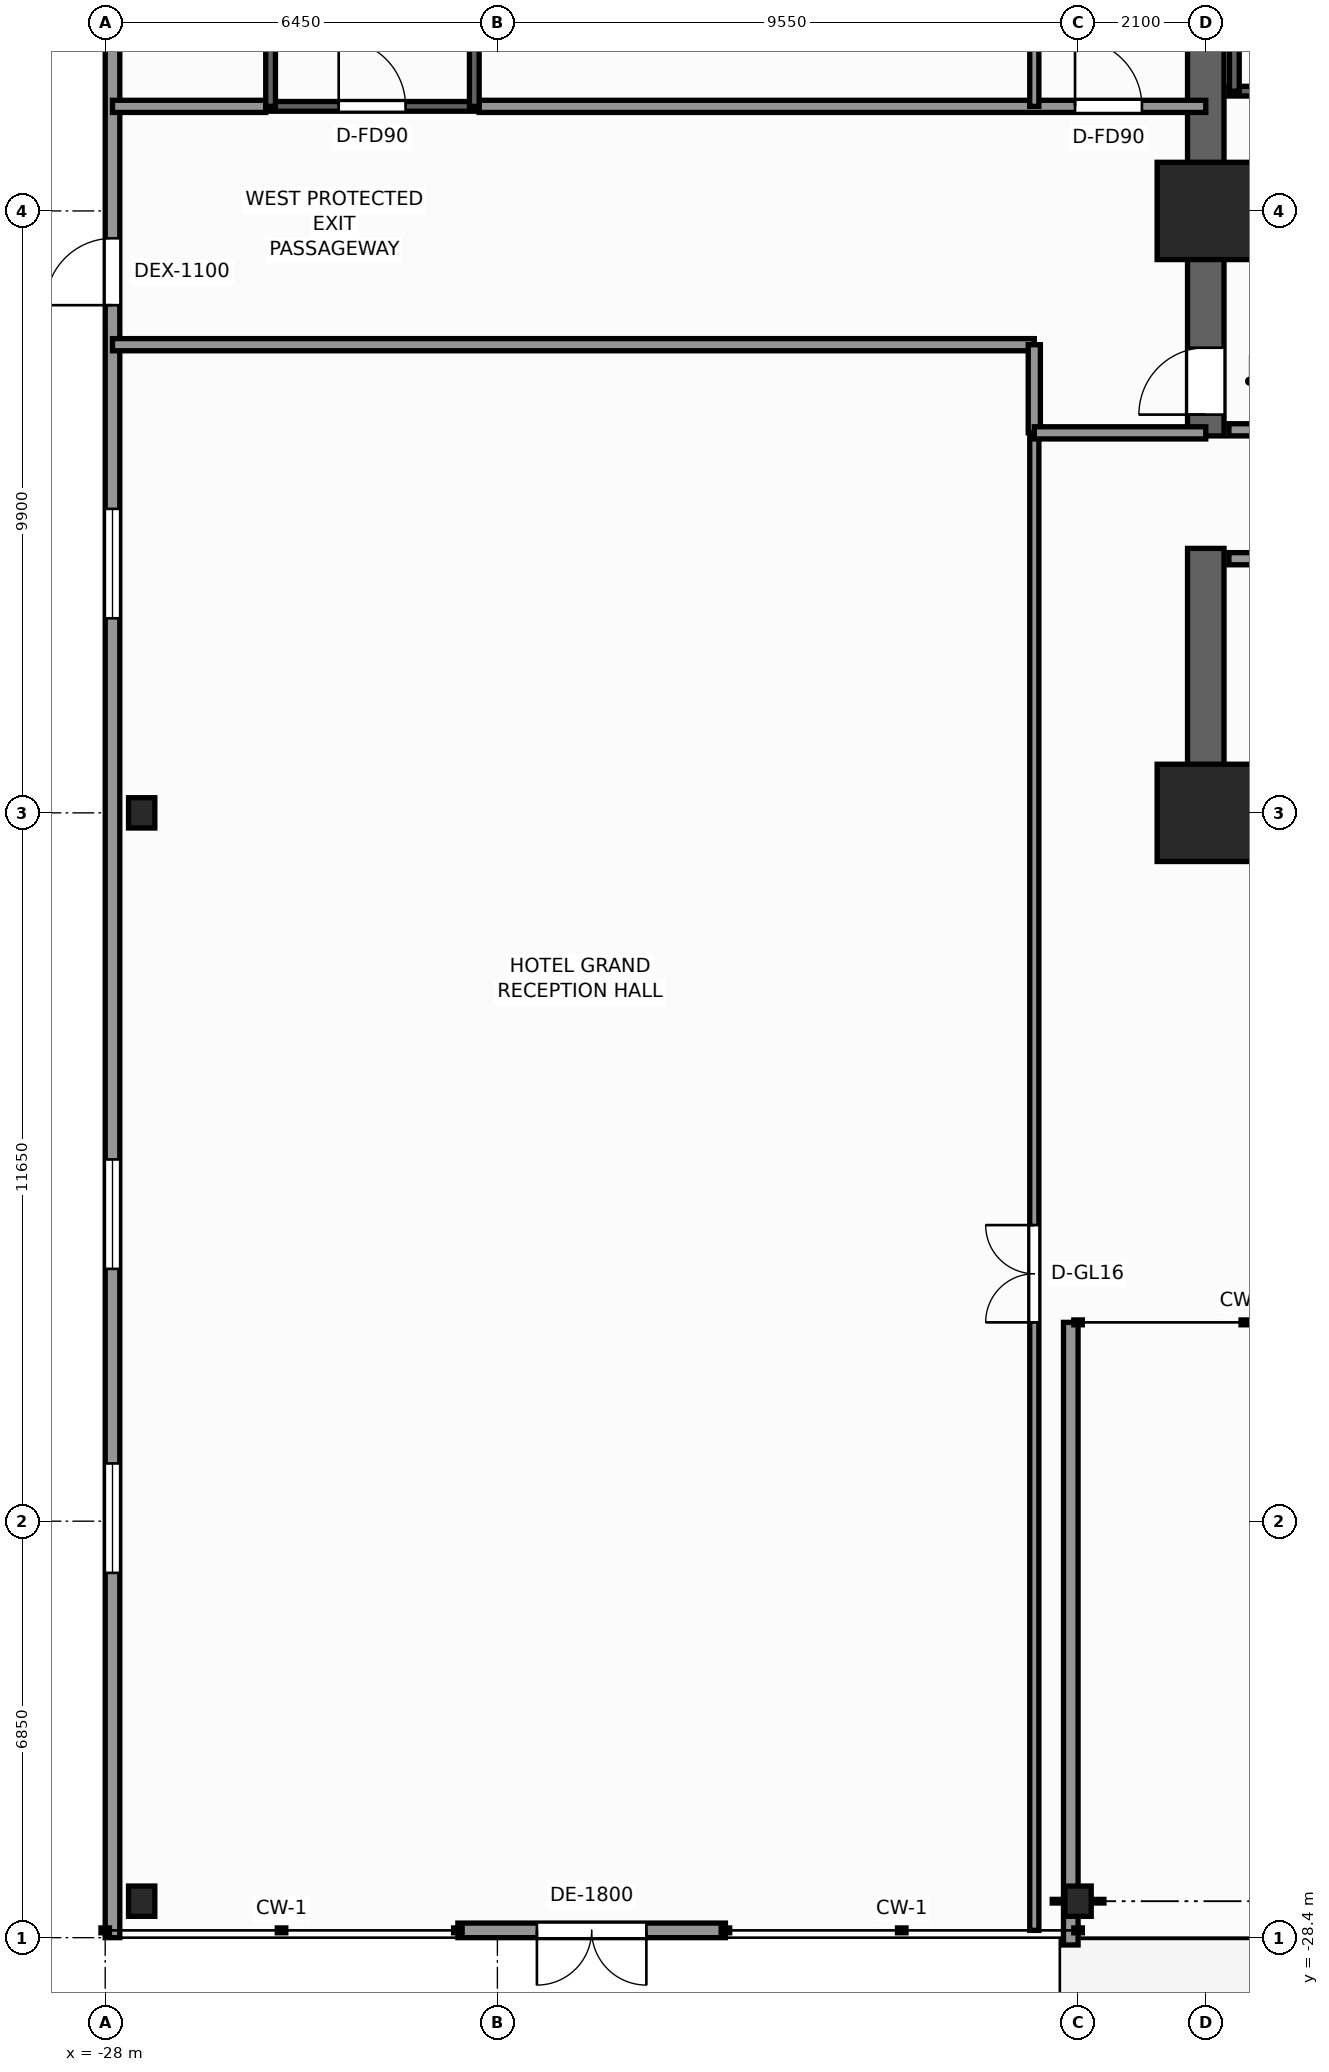
"""IFC4 building model, lengths in metres.
Left out: names, types, materials, properties, quantities, classifications, styles, units other than length and angle.
Written with IfcOpenShell. Run it as: python <this file> out.ifc"""

import sys

from ifc_helpers import new_model, si_unit, direction, frame, frame_2d, origin, origin_2d, place, context, subcontext, project, spatial, rectangle, i_section, extrude, element, fill, save


model = new_model("IFC4")
c1 = context("Model", 3, precision=1e-05, world=origin(), true_north=direction((0.0, 1.0)))
c2 = subcontext(c1, "Body", "Model", "MODEL_VIEW")
j1 = project(units=[si_unit("LENGTHUNIT", "METRE"), si_unit("PLANEANGLEUNIT", "RADIAN")], contexts=[c1])
p1 = place(None, origin())
s1 = spatial("IfcSite", under=j1, at=p1, CompositionType="ELEMENT")
p2 = place(p1, origin())
s2 = spatial("IfcBuilding", under=s1, at=p2, CompositionType="ELEMENT")
p3 = place(p2, origin())
s3 = spatial("IfcBuildingStorey", under=s2, at=p3, CompositionType="ELEMENT", Elevation=0.0)
p4 = place(p3, frame((-3.54, -9.9, 0.0), z_axis=(0.0, 0.0, 1.0), x_axis=(-1.0, 0.0, 0.0)))
e1 = element("IfcWall", 1, at=p4, inside=s3, PredefinedType="SHEAR", context=c2, shape_type="SweptSolid", body=[
    extrude(rectangle(XDim=6.66, YDim=0.6, at=frame_2d((3.33, 0.0))), origin(), (0.0, 0.0, 1.0), 5.5),
])
p5 = place(p3, frame((-9.9, -9.6, 0.0), z_axis=(0.0, 0.0, 1.0), x_axis=(0.0, 1.0, 0.0)))
e2 = element("IfcWall", 2, at=p5, inside=s3, PredefinedType="SHEAR", context=c2, shape_type="SweptSolid", body=[
    extrude(rectangle(XDim=4.05, YDim=0.6, at=frame_2d((2.025, 0.0))), origin(), (0.0, 0.0, 1.0), 5.5),
])
p6 = place(p3, frame((-9.9, -3.7, 0.0), z_axis=(0.0, 0.0, 1.0), x_axis=(0.0, 1.0, 0.0)))
e3 = element("IfcWall", 3, at=p6, inside=s3, PredefinedType="SHEAR", context=c2, shape_type="SweptSolid", body=[
    extrude(rectangle(XDim=13.3, YDim=0.6, at=frame_2d((6.65, 0.0))), origin(), (0.0, 0.0, 1.0), 5.5),
])
p7 = place(p6, frame((0.35, 0.0, 0.0)))
e4 = element("IfcOpeningElement", 4, at=p7, cuts=e3, PredefinedType="OPENING", context=c2, shape_type="SweptSolid", body=[
    extrude(rectangle(XDim=1.1, YDim=2.2, at=frame_2d((0.55, 1.1))), frame((0.0, 0.31, 0.0), z_axis=(0.0, -1.0, 0.0), x_axis=(1.0, 0.0, 0.0)), (0.0, 0.0, 1.0), 0.62),
])
for number, where, z_axis, x_axis in (
    (5, (-9.9, -9.9, 0.0), (0.0, 0.0, 1.0), (1.0, 0.0, 0.0)),
    (6, (-9.9, 0.0, 0.0), (0.0, 0.0, 1.0), (1.0, 0.0, 0.0)),
):
    element("IfcColumn", number, at=place(p3, frame(where, z_axis=z_axis, x_axis=x_axis)), inside=s3, PredefinedType="COLUMN", context=c2, shape_type="SweptSolid", body=[
        extrude(rectangle(XDim=1.6, YDim=1.6, at=origin_2d()), origin(), (0.0, 0.0, 1.0), 5.5),
    ])
for number, where, z_axis, x_axis in (
    (7, (-27.4, -27.8, 0.0), (0.0, 0.0, 1.0), (1.0, 0.0, 0.0)),
    (8, (-12.0, -27.8, 0.0), (0.0, 0.0, 1.0), (1.0, 0.0, 0.0)),
    (9, (-27.4, -9.9, 0.0), (0.0, 0.0, 1.0), (1.0, 0.0, 0.0)),
):
    element("IfcColumn", number, at=place(p3, frame(where, z_axis=z_axis, x_axis=x_axis)), inside=s3, PredefinedType="COLUMN", context=c2, shape_type="SweptSolid", body=[
        extrude(i_section(OverallWidth=0.432, OverallDepth=0.498, WebThickness=0.056, FlangeThickness=0.089, FilletRadius=0.025, at=origin_2d()), origin(), (0.0, 0.0, 1.0), 5.5),
    ])
p8 = place(p3, frame((-17.8, -28.28, 0.0), z_axis=(0.0, 0.0, 1.0), x_axis=(-1.0, 0.0, 0.0)))
e10 = element("IfcWall", 10, at=p8, inside=s3, PredefinedType="STANDARD", context=c2, shape_type="SweptSolid", body=[
    extrude(rectangle(XDim=4.4, YDim=0.24, at=frame_2d((2.2, 0.0))), origin(), (0.0, 0.0, 1.0), 5.22),
])
p9 = place(p8, frame((1.3, 0.0, 0.0)))
e11 = element("IfcOpeningElement", 11, at=p9, cuts=e10, PredefinedType="OPENING", context=c2, shape_type="SweptSolid", body=[
    extrude(rectangle(XDim=1.8, YDim=2.3, at=frame_2d((0.9, 1.15))), frame((0.0, 0.13, 0.0), z_axis=(0.0, -1.0, 0.0), x_axis=(1.0, 0.0, 0.0)), (0.0, 0.0, 1.0), 0.26),
])
p10 = place(p3, frame((-12.12, -18.28, 0.0), z_axis=(0.0, 0.0, 1.0), x_axis=(0.0, -1.0, 0.0)))
e12 = element("IfcWall", 12, at=p10, inside=s3, PredefinedType="STANDARD", context=c2, shape_type="SweptSolid", body=[
    extrude(rectangle(XDim=10.24, YDim=0.24, at=frame_2d((5.12, 0.0))), origin(), (0.0, 0.0, 1.0), 4.288),
])
p11 = place(p3, frame((-27.88, -28.4, 0.0), z_axis=(0.0, 0.0, 1.0), x_axis=(0.0, 1.0, 0.0)))
e13 = element("IfcWall", 13, at=p11, inside=s3, PredefinedType="STANDARD", context=c2, shape_type="SweptSolid", body=[
    extrude(rectangle(XDim=56.8, YDim=0.24, at=frame_2d((28.4, 0.0))), origin(), (0.0, 0.0, 1.0), 4.748),
])
p12 = place(p11, frame((26.85, 0.0, 0.0)))
e14 = element("IfcOpeningElement", 14, at=p12, cuts=e13, PredefinedType="OPENING", context=c2, shape_type="SweptSolid", body=[
    extrude(rectangle(XDim=1.1, YDim=2.2, at=frame_2d((0.55, 1.1))), frame((0.0, 0.13, 0.0), z_axis=(0.0, -1.0, 0.0), x_axis=(1.0, 0.0, 0.0)), (0.0, 0.0, 1.0), 0.26),
])
p13 = place(p11, frame((40.45, 0.0, 0.0)))
e15 = element("IfcOpeningElement", 15, at=p13, cuts=e13, PredefinedType="OPENING", context=c2, shape_type="SweptSolid", body=[
    extrude(rectangle(XDim=1.1, YDim=2.2, at=frame_2d((0.55, 1.1))), frame((0.0, 0.13, 0.0), z_axis=(0.0, -1.0, 0.0), x_axis=(1.0, 0.0, 0.0)), (0.0, 0.0, 1.0), 0.26),
])
p14 = place(p11, frame((47.35, 0.0, 0.0)))
e16 = element("IfcOpeningElement", 16, at=p14, cuts=e13, PredefinedType="OPENING", context=c2, shape_type="SweptSolid", body=[
    extrude(rectangle(XDim=1.1, YDim=2.2, at=frame_2d((0.55, 1.1))), frame((0.0, 0.13, 0.0), z_axis=(0.0, -1.0, 0.0), x_axis=(1.0, 0.0, 0.0)), (0.0, 0.0, 1.0), 0.26),
])
p15 = place(p11, frame((6.0, 0.0, 0.75)))
e17 = element("IfcOpeningElement", 17, at=p15, cuts=e13, PredefinedType="OPENING", context=c2, shape_type="SweptSolid", body=[
    extrude(rectangle(XDim=1.8, YDim=2.4, at=frame_2d((0.9, 1.2))), frame((0.0, 0.13, 0.0), z_axis=(0.0, -1.0, 0.0), x_axis=(1.0, 0.0, 0.0)), (0.0, 0.0, 1.0), 0.26),
])
p16 = place(p11, frame((11.0, 0.0, 0.75)))
e18 = element("IfcOpeningElement", 18, at=p16, cuts=e13, PredefinedType="OPENING", context=c2, shape_type="SweptSolid", body=[
    extrude(rectangle(XDim=1.8, YDim=2.4, at=frame_2d((0.9, 1.2))), frame((0.0, 0.13, 0.0), z_axis=(0.0, -1.0, 0.0), x_axis=(1.0, 0.0, 0.0)), (0.0, 0.0, 1.0), 0.26),
])
p17 = place(p11, frame((21.7, 0.0, 0.75)))
e19 = element("IfcOpeningElement", 19, at=p17, cuts=e13, PredefinedType="OPENING", context=c2, shape_type="SweptSolid", body=[
    extrude(rectangle(XDim=1.8, YDim=2.4, at=frame_2d((0.9, 1.2))), frame((0.0, 0.13, 0.0), z_axis=(0.0, -1.0, 0.0), x_axis=(1.0, 0.0, 0.0)), (0.0, 0.0, 1.0), 0.26),
])
p18 = place(p3, frame((-9.52, 1.97, 0.0), z_axis=(0.0, 0.0, 1.0), x_axis=(1.0, 0.0, 0.0)))
e20 = element("IfcWall", 20, at=p18, inside=s3, PredefinedType="SHEAR", context=c2, shape_type="SweptSolid", body=[
    extrude(rectangle(XDim=3.52, YDim=0.16, at=frame_2d((1.76, 0.0))), origin(), (0.0, 0.0, 1.0), 5.5),
])
p19 = place(p18, frame((1.15, 0.0, 0.0)))
e21 = element("IfcOpeningElement", 21, at=p19, cuts=e20, PredefinedType="OPENING", context=c2, shape_type="SweptSolid", body=[
    extrude(rectangle(XDim=1.1, YDim=2.2, at=frame_2d((0.55, 1.1))), frame((0.0, 0.09, 0.0), z_axis=(0.0, -1.0, 0.0), x_axis=(1.0, 0.0, 0.0)), (0.0, 0.0, 1.0), 0.18),
])
p20 = place(p3, frame((-9.43, 1.97, 0.0), z_axis=(0.0, 0.0, 1.0), x_axis=(0.0, 1.0, 0.0)))
e22 = element("IfcWall", 22, at=p20, inside=s3, PredefinedType="SHEAR", context=c2, shape_type="SweptSolid", body=[
    extrude(rectangle(XDim=7.56, YDim=0.16, at=frame_2d((3.78, 0.0))), origin(), (0.0, 0.0, 1.0), 5.5),
])
p21 = place(p3, frame((-9.52, -3.6, 0.0), z_axis=(0.0, 0.0, 1.0), x_axis=(1.0, 0.0, 0.0)))
e23 = element("IfcWall", 23, at=p21, inside=s3, PredefinedType="SOLIDWALL", context=c2, shape_type="SweptSolid", body=[
    extrude(rectangle(XDim=3.77, YDim=0.2, at=frame_2d((1.885, 0.0))), origin(), (0.0, 0.0, 1.0), 5.22),
])
p22 = place(p21, frame((1.15, 0.0, 0.0)))
e24 = element("IfcOpeningElement", 24, at=p22, cuts=e23, PredefinedType="OPENING", context=c2, shape_type="SweptSolid", body=[
    extrude(rectangle(XDim=0.95, YDim=2.06, at=frame_2d((0.475, 1.03))), frame((0.0, 0.11, 0.0), z_axis=(0.0, -1.0, 0.0), x_axis=(1.0, 0.0, 0.0)), (0.0, 0.0, 1.0), 0.22),
])
p23 = place(p3, frame((-9.52, -5.72, 0.0), z_axis=(0.0, 0.0, 1.0), x_axis=(1.0, 0.0, 0.0)))
e25 = element("IfcWall", 25, at=p23, inside=s3, PredefinedType="SOLIDWALL", context=c2, shape_type="SweptSolid", body=[
    extrude(rectangle(XDim=5.66, YDim=0.2, at=frame_2d((2.83, 0.0))), origin(), (0.0, 0.0, 1.0), 5.22),
])
p24 = place(p23, frame((3.6, 0.0, 0.0)))
e26 = element("IfcOpeningElement", 26, at=p24, cuts=e25, PredefinedType="OPENING", context=c2, shape_type="SweptSolid", body=[
    extrude(rectangle(XDim=0.95, YDim=2.06, at=frame_2d((0.475, 1.03))), frame((0.0, 0.11, 0.0), z_axis=(0.0, -1.0, 0.0), x_axis=(1.0, 0.0, 0.0)), (0.0, 0.0, 1.0), 0.22),
])
p25 = place(p3, frame((-12.72, -28.28, 0.0), z_axis=(0.0, 0.0, 1.0), x_axis=(0.0, 1.0, 0.0)))
e27 = element("IfcWall", 27, at=p25, inside=s3, PredefinedType="PARTITIONING", context=c2, shape_type="SweptSolid", body=[
    extrude(rectangle(XDim=24.63, YDim=0.15, at=frame_2d((12.315, 0.0))), origin(), (0.0, 0.0, 1.0), 4.278),
])
p26 = place(p25, frame((10.0, 0.0, 0.0)))
e28 = element("IfcOpeningElement", 28, at=p26, cuts=e27, PredefinedType="OPENING", context=c2, shape_type="SweptSolid", body=[
    extrude(rectangle(XDim=1.6, YDim=2.3, at=frame_2d((0.8, 1.15))), frame((0.0, 0.085, 0.0), z_axis=(0.0, -1.0, 0.0), x_axis=(1.0, 0.0, 0.0)), (0.0, 0.0, 1.0), 0.17),
])
p27 = place(p3, frame((-27.88, -2.2, 0.0), z_axis=(0.0, 0.0, 1.0), x_axis=(1.0, 0.0, 0.0)))
e29 = element("IfcWall", 29, at=p27, inside=s3, PredefinedType="SOLIDWALL", context=c2, shape_type="SweptSolid", body=[
    extrude(rectangle(XDim=15.16, YDim=0.2, at=frame_2d((7.58, 0.0))), origin(), (0.0, 0.0, 1.0), 4.589),
])
p28 = place(p3, frame((-12.72, -3.65, 0.0), z_axis=(0.0, 0.0, 1.0), x_axis=(0.0, 1.0, 0.0)))
e30 = element("IfcWall", 30, at=p28, inside=s3, PredefinedType="SOLIDWALL", context=c2, shape_type="SweptSolid", body=[
    extrude(rectangle(XDim=1.45, YDim=0.2, at=frame_2d((0.725, 0.0))), origin(), (0.0, 0.0, 1.0), 4.745),
])
p29 = place(p3, frame((-12.72, -3.65, 0.0), z_axis=(0.0, 0.0, 1.0), x_axis=(1.0, 0.0, 0.0)))
e31 = element("IfcWall", 31, at=p29, inside=s3, PredefinedType="SOLIDWALL", context=c2, shape_type="SweptSolid", body=[
    extrude(rectangle(XDim=2.82, YDim=0.2, at=frame_2d((1.41, 0.0))), origin(), (0.0, 0.0, 1.0), 4.255),
])
p30 = place(p3, frame((-27.88, 1.72, 0.0), z_axis=(0.0, 0.0, 1.0), x_axis=(1.0, 0.0, 0.0)))
e32 = element("IfcWall", 32, at=p30, inside=s3, PredefinedType="SOLIDWALL", context=c2, shape_type="SweptSolid", body=[
    extrude(rectangle(XDim=2.52, YDim=0.2, at=frame_2d((1.26, 0.0))), origin(), (0.0, 0.0, 1.0), 4.589),
])
p31 = place(p3, frame((-21.85, 1.72, 0.0), z_axis=(0.0, 0.0, 1.0), x_axis=(1.0, 0.0, 0.0)))
e33 = element("IfcWall", 33, at=p31, inside=s3, PredefinedType="SOLIDWALL", context=c2, shape_type="SweptSolid", body=[
    extrude(rectangle(XDim=11.95, YDim=0.2, at=frame_2d((5.975, 0.0))), origin(), (0.0, 0.0, 1.0), 5.22),
])
p32 = place(p31, frame((9.8, 0.0, 0.0)))
e34 = element("IfcOpeningElement", 34, at=p32, cuts=e33, PredefinedType="OPENING", context=c2, shape_type="SweptSolid", body=[
    extrude(rectangle(XDim=1.1, YDim=2.2, at=frame_2d((0.55, 1.1))), frame((0.0, 0.11, 0.0), z_axis=(0.0, -1.0, 0.0), x_axis=(1.0, 0.0, 0.0)), (0.0, 0.0, 1.0), 0.22),
])
p33 = place(p3, frame((-12.72, 1.72, 0.0), z_axis=(0.0, 0.0, 1.0), x_axis=(0.0, 1.0, 0.0)))
e35 = element("IfcWall", 35, at=p33, inside=s3, PredefinedType="PARTITIONING", context=c2, shape_type="SweptSolid", body=[
    extrude(rectangle(XDim=11.0, YDim=0.15, at=frame_2d((5.5, 0.0))), origin(), (0.0, 0.0, 1.0), 4.278),
])
p34 = place(p33, frame((3.2, 0.0, 0.0)))
e36 = element("IfcOpeningElement", 36, at=p34, cuts=e35, PredefinedType="OPENING", context=c2, shape_type="SweptSolid", body=[
    extrude(rectangle(XDim=0.95, YDim=2.06, at=frame_2d((0.475, 1.03))), frame((0.0, 0.085, 0.0), z_axis=(0.0, -1.0, 0.0), x_axis=(1.0, 0.0, 0.0)), (0.0, 0.0, 1.0), 0.17),
])
p35 = place(p3, frame((-25.36, 1.72, 0.0), z_axis=(0.0, 0.0, 1.0), x_axis=(1.0, 0.0, 0.0)))
e37 = element("IfcWall", 37, at=p35, inside=s3, PredefinedType="SHEAR", context=c2, shape_type="SweptSolid", body=[
    extrude(rectangle(XDim=3.51, YDim=0.16, at=frame_2d((1.755, 0.0))), origin(), (0.0, 0.0, 1.0), 5.5),
])
p36 = place(p35, frame((1.2, 0.0, 0.0)))
e38 = element("IfcOpeningElement", 38, at=p36, cuts=e37, PredefinedType="OPENING", context=c2, shape_type="SweptSolid", body=[
    extrude(rectangle(XDim=1.1, YDim=2.2, at=frame_2d((0.55, 1.1))), frame((0.0, 0.09, 0.0), z_axis=(0.0, -1.0, 0.0), x_axis=(1.0, 0.0, 0.0)), (0.0, 0.0, 1.0), 0.18),
])
for number, where, z_axis, x_axis in (
    (39, (-25.28, 1.72, 0.0), (0.0, 0.0, 1.0), (0.0, 1.0, 0.0)),
    (40, (-21.93, 1.72, 0.0), (0.0, 0.0, 1.0), (0.0, 1.0, 0.0)),
):
    element("IfcWall", number, at=place(p3, frame(where, z_axis=z_axis, x_axis=x_axis)), inside=s3, PredefinedType="SHEAR", context=c2, shape_type="SweptSolid", body=[
        extrude(rectangle(XDim=7.56, YDim=0.16, at=frame_2d((3.78, 0.0))), origin(), (0.0, 0.0, 1.0), 5.5),
    ])
p37 = place(p9, origin())
e41 = element("IfcDoor", 41, at=p37, inside=s3, OperationType="DOUBLE_DOOR_SINGLE_SWING", PredefinedType="DOOR", context=c2, shape_type="SweptSolid", body=[
    extrude(rectangle(XDim=1.8, YDim=2.3, at=frame_2d((0.9, 1.15))), frame((0.0, 0.025, 0.0), z_axis=(0.0, -1.0, 0.0), x_axis=(1.0, 0.0, 0.0)), (0.0, 0.0, 1.0), 0.05),
])
fill(e11, e41)
p38 = place(p12, origin())
e42 = element("IfcDoor", 42, at=p38, inside=s3, OperationType="SINGLE_SWING_LEFT", PredefinedType="DOOR", context=c2, shape_type="SweptSolid", body=[
    extrude(rectangle(XDim=1.1, YDim=2.2, at=frame_2d((0.55, 1.1))), frame((0.0, 0.025, 0.0), z_axis=(0.0, -1.0, 0.0), x_axis=(1.0, 0.0, 0.0)), (0.0, 0.0, 1.0), 0.05),
])
fill(e14, e42)
p39 = place(p15, origin())
e43 = element("IfcWindow", 43, at=p39, inside=s3, PartitioningType="SINGLE_PANEL", PredefinedType="WINDOW", context=c2, shape_type="SweptSolid", body=[
    extrude(rectangle(XDim=1.8, YDim=2.4, at=frame_2d((0.9, 1.2))), frame((0.0, 0.03, 0.0), z_axis=(0.0, -1.0, 0.0), x_axis=(1.0, 0.0, 0.0)), (0.0, 0.0, 1.0), 0.06),
])
fill(e17, e43)
p40 = place(p16, origin())
e44 = element("IfcWindow", 44, at=p40, inside=s3, PartitioningType="SINGLE_PANEL", PredefinedType="WINDOW", context=c2, shape_type="SweptSolid", body=[
    extrude(rectangle(XDim=1.8, YDim=2.4, at=frame_2d((0.9, 1.2))), frame((0.0, 0.03, 0.0), z_axis=(0.0, -1.0, 0.0), x_axis=(1.0, 0.0, 0.0)), (0.0, 0.0, 1.0), 0.06),
])
fill(e18, e44)
p41 = place(p17, origin())
e45 = element("IfcWindow", 45, at=p41, inside=s3, PartitioningType="SINGLE_PANEL", PredefinedType="WINDOW", context=c2, shape_type="SweptSolid", body=[
    extrude(rectangle(XDim=1.8, YDim=2.4, at=frame_2d((0.9, 1.2))), frame((0.0, 0.03, 0.0), z_axis=(0.0, -1.0, 0.0), x_axis=(1.0, 0.0, 0.0)), (0.0, 0.0, 1.0), 0.06),
])
fill(e19, e45)
p42 = place(p7, origin())
e46 = element("IfcDoor", 46, at=p42, inside=s3, OperationType="SINGLE_SWING_LEFT", PredefinedType="DOOR", context=c2, shape_type="SweptSolid", body=[
    extrude(rectangle(XDim=1.1, YDim=2.2, at=frame_2d((0.55, 1.1))), frame((0.0, 0.025, 0.0), z_axis=(0.0, -1.0, 0.0), x_axis=(1.0, 0.0, 0.0)), (0.0, 0.0, 1.0), 0.05),
])
fill(e4, e46)
p43 = place(p32, origin())
e47 = element("IfcDoor", 47, at=p43, inside=s3, OperationType="SINGLE_SWING_LEFT", PredefinedType="DOOR", context=c2, shape_type="SweptSolid", body=[
    extrude(rectangle(XDim=1.1, YDim=2.2, at=frame_2d((0.55, 1.1))), frame((0.0, 0.025, 0.0), z_axis=(0.0, -1.0, 0.0), x_axis=(1.0, 0.0, 0.0)), (0.0, 0.0, 1.0), 0.05),
])
fill(e34, e47)
p44 = place(p26, origin())
e48 = element("IfcDoor", 48, at=p44, inside=s3, OperationType="DOUBLE_DOOR_SINGLE_SWING", PredefinedType="DOOR", context=c2, shape_type="SweptSolid", body=[
    extrude(rectangle(XDim=1.6, YDim=2.3, at=frame_2d((0.8, 1.15))), frame((0.0, 0.025, 0.0), z_axis=(0.0, -1.0, 0.0), x_axis=(1.0, 0.0, 0.0)), (0.0, 0.0, 1.0), 0.05),
])
fill(e28, e48)
p45 = place(p36, origin())
e49 = element("IfcDoor", 49, at=p45, inside=s3, OperationType="SINGLE_SWING_LEFT", PredefinedType="DOOR", context=c2, shape_type="SweptSolid", body=[
    extrude(rectangle(XDim=1.1, YDim=2.2, at=frame_2d((0.55, 1.1))), frame((0.0, 0.025, 0.0), z_axis=(0.0, -1.0, 0.0), x_axis=(1.0, 0.0, 0.0)), (0.0, 0.0, 1.0), 0.05),
])
fill(e38, e49)
save(model, sys.argv[1])
